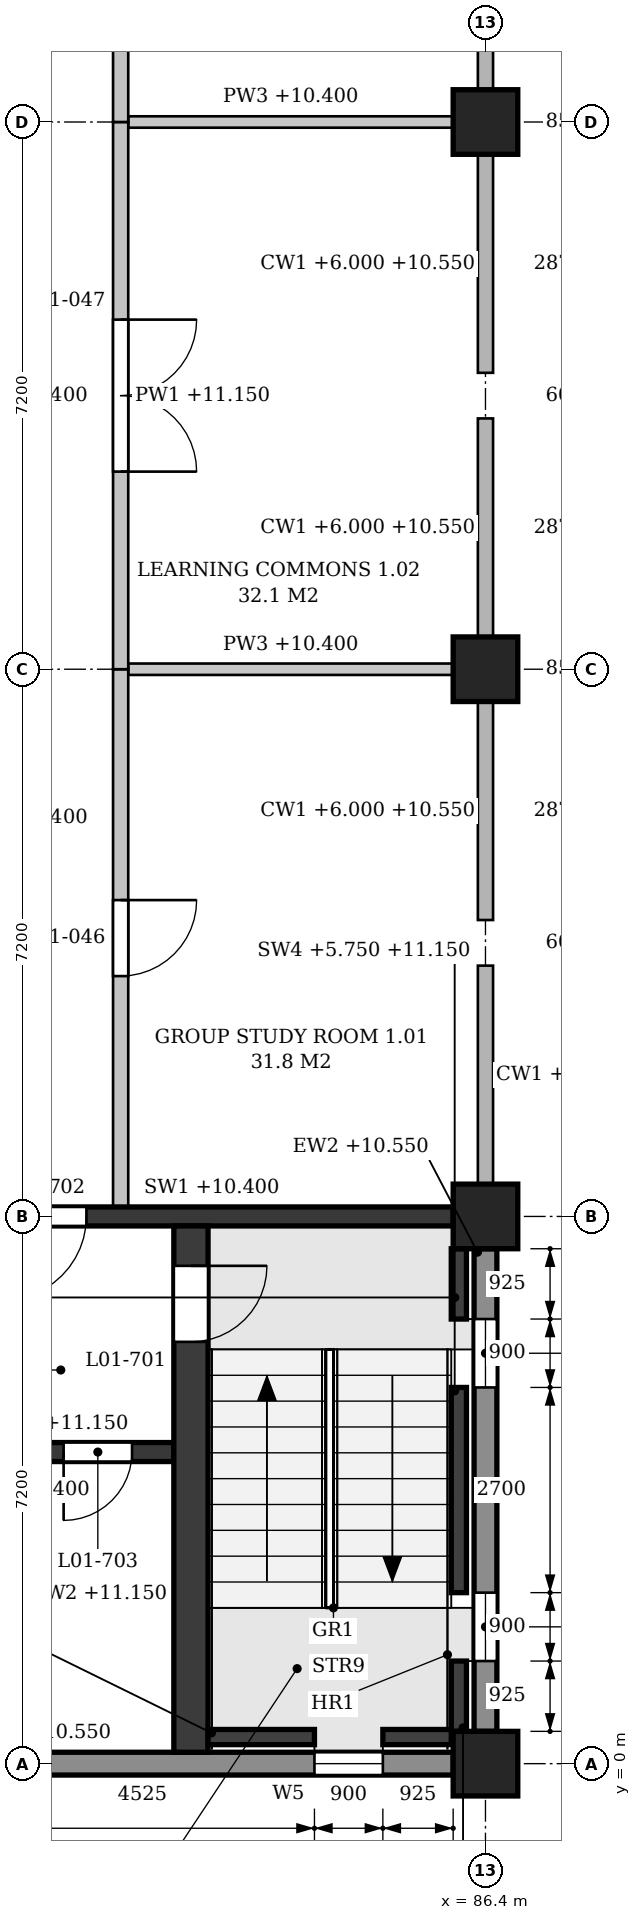
"""IFC4 building model, lengths in metres.
Left out: names, types, materials, properties, quantities, classifications, styles, units other than length and angle.
Written with IfcOpenShell. Run it as: python <this file> out.ifc"""

import sys

from ifc_helpers import new_model, si_unit, direction, frame, frame_2d, origin, origin_2d, place, context, subcontext, project, spatial, polyline, rectangle, outline, extrude, element, fill, save


model = new_model("IFC4")
c1 = context("Model", 3, precision=1e-05, world=origin(), true_north=direction((0.0, 1.0)))
c2 = subcontext(c1, "Body", "Model", "MODEL_VIEW")
j1 = project(units=[si_unit("LENGTHUNIT", "METRE"), si_unit("PLANEANGLEUNIT", "RADIAN")], contexts=[c1])
p1 = place(None, origin())
s1 = spatial("IfcSite", under=j1, at=p1, CompositionType="ELEMENT")
p2 = place(p1, origin())
s2 = spatial("IfcBuilding", under=s1, at=p2, CompositionType="ELEMENT")
p3 = place(p2, frame((0.0, 0.0, 6.0)))
s3 = spatial("IfcBuildingStorey", under=s2, at=p3, CompositionType="ELEMENT", Elevation=6.0)
for number, where, z_axis, x_axis in (
    (1, (86.4, 0.0, 0.0), (0.0, 0.0, 1.0), (1.0, 0.0, 0.0)),
    (2, (86.4, 7.2, 0.0), (0.0, 0.0, 1.0), (1.0, 0.0, 0.0)),
    (3, (86.4, 14.4, 0.0), (0.0, 0.0, 1.0), (1.0, 0.0, 0.0)),
    (4, (86.4, 21.6, 0.0), (0.0, 0.0, 1.0), (1.0, 0.0, 0.0)),
):
    element("IfcColumn", number, at=place(p3, frame(where, z_axis=z_axis, x_axis=x_axis)), inside=s3, PredefinedType="COLUMN", context=c2, shape_type="SweptSolid", body=[
        extrude(rectangle(XDim=0.85, YDim=0.85, at=origin_2d()), origin(), (0.0, 0.0, 1.0), 5.4),
    ])
p4 = place(p3, frame((79.625, 0.0, 0.0), z_axis=(0.0, 0.0, 1.0), x_axis=(1.0, 0.0, 0.0)))
e5 = element("IfcWall", 5, at=p4, inside=s3, PredefinedType="STANDARD", context=c2, shape_type="SweptSolid", body=[
    extrude(rectangle(XDim=6.35, YDim=0.3, at=frame_2d((3.175, 0.0))), origin(), (0.0, 0.0, 1.0), 4.55),
])
p5 = place(p4, frame((4.525, 0.0, 0.9)))
e6 = element("IfcOpeningElement", 6, at=p5, cuts=e5, PredefinedType="OPENING", context=c2, shape_type="SweptSolid", body=[
    extrude(outline(polyline([(0.0, 0.0), (0.9, 0.0), (0.9, 3.15), (0.45, 3.6), (0.0, 3.15), (0.0, 0.0)])), frame((0.0, 0.16, 0.0), z_axis=(0.0, -1.0, 0.0), x_axis=(1.0, 0.0, 0.0)), (0.0, 0.0, 1.0), 0.32),
])
p6 = place(p3, frame((86.4, 0.425, 0.0), z_axis=(0.0, 0.0, 1.0), x_axis=(0.0, 1.0, 0.0)))
e7 = element("IfcWall", 7, at=p6, inside=s3, PredefinedType="STANDARD", context=c2, shape_type="SweptSolid", body=[
    extrude(rectangle(XDim=6.35, YDim=0.3, at=frame_2d((3.175, 0.0))), origin(), (0.0, 0.0, 1.0), 4.55),
])
p7 = place(p6, frame((0.925, 0.0, 0.9)))
e8 = element("IfcOpeningElement", 8, at=p7, cuts=e7, PredefinedType="OPENING", context=c2, shape_type="SweptSolid", body=[
    extrude(outline(polyline([(0.0, 0.0), (0.9, 0.0), (0.9, 3.15), (0.45, 3.6), (0.0, 3.15), (0.0, 0.0)])), frame((0.0, 0.16, 0.0), z_axis=(0.0, -1.0, 0.0), x_axis=(1.0, 0.0, 0.0)), (0.0, 0.0, 1.0), 0.32),
])
p8 = place(p6, frame((4.525, 0.0, 0.9)))
e9 = element("IfcOpeningElement", 9, at=p8, cuts=e7, PredefinedType="OPENING", context=c2, shape_type="SweptSolid", body=[
    extrude(outline(polyline([(0.0, 0.0), (0.9, 0.0), (0.9, 3.15), (0.45, 3.6), (0.0, 3.15), (0.0, 0.0)])), frame((0.0, 0.16, 0.0), z_axis=(0.0, -1.0, 0.0), x_axis=(1.0, 0.0, 0.0)), (0.0, 0.0, 1.0), 0.32),
])
p9 = place(p3, frame((79.625, 7.2, 0.0), z_axis=(0.0, 0.0, 1.0), x_axis=(1.0, 0.0, 0.0)))
e10 = element("IfcWall", 10, at=p9, inside=s3, PredefinedType="SHEAR", context=c2, shape_type="SweptSolid", body=[
    extrude(rectangle(XDim=6.35, YDim=0.25, at=frame_2d((3.175, 0.0))), origin(), (0.0, 0.0, 1.0), 4.4),
])
p10 = place(p9, frame((0.425, 0.0, 0.0)))
e11 = element("IfcOpeningElement", 11, at=p10, cuts=e10, PredefinedType="OPENING", context=c2, shape_type="SweptSolid", body=[
    extrude(rectangle(XDim=1.1, YDim=2.1, at=frame_2d((0.55, 1.05))), frame((0.0, 0.135, 0.0), z_axis=(0.0, -1.0, 0.0), x_axis=(1.0, 0.0, 0.0)), (0.0, 0.0, 1.0), 0.27),
])
p11 = place(p3, frame((86.05, 0.425, -0.25), z_axis=(0.0, 0.0, 1.0), x_axis=(0.0, 1.0, 0.0)))
e12 = element("IfcWall", 12, at=p11, inside=s3, PredefinedType="SHEAR", context=c2, shape_type="SweptSolid", body=[
    extrude(rectangle(XDim=0.925, YDim=0.2, at=frame_2d((0.462, 0.0))), origin(), (0.0, 0.0, 1.0), 5.4),
])
p12 = place(p3, frame((86.05, 2.25, -0.25), z_axis=(0.0, 0.0, 1.0), x_axis=(0.0, 1.0, 0.0)))
e13 = element("IfcWall", 13, at=p12, inside=s3, PredefinedType="SHEAR", context=c2, shape_type="SweptSolid", body=[
    extrude(rectangle(XDim=2.7, YDim=0.2, at=frame_2d((1.35, 0.0))), origin(), (0.0, 0.0, 1.0), 5.4),
])
p13 = place(p3, frame((86.05, 5.85, -0.25), z_axis=(0.0, 0.0, 1.0), x_axis=(0.0, 1.0, 0.0)))
e14 = element("IfcWall", 14, at=p13, inside=s3, PredefinedType="SHEAR", context=c2, shape_type="SweptSolid", body=[
    extrude(rectangle(XDim=0.925, YDim=0.2, at=frame_2d((0.462, 0.0))), origin(), (0.0, 0.0, 1.0), 5.4),
])
p14 = place(p3, frame((82.75, 0.35, -0.25), z_axis=(0.0, 0.0, 1.0), x_axis=(1.0, 0.0, 0.0)))
e15 = element("IfcWall", 15, at=p14, inside=s3, PredefinedType="SHEAR", context=c2, shape_type="SweptSolid", body=[
    extrude(rectangle(XDim=1.4, YDim=0.2, at=frame_2d((0.7, 0.0))), origin(), (0.0, 0.0, 1.0), 5.4),
])
p15 = place(p3, frame((85.05, 0.35, -0.25), z_axis=(0.0, 0.0, 1.0), x_axis=(1.0, 0.0, 0.0)))
e16 = element("IfcWall", 16, at=p15, inside=s3, PredefinedType="SHEAR", context=c2, shape_type="SweptSolid", body=[
    extrude(rectangle(XDim=0.9, YDim=0.2, at=frame_2d((0.45, 0.0))), origin(), (0.0, 0.0, 1.0), 5.4),
])
p16 = place(p3, frame((82.525, 0.15, 0.0), z_axis=(0.0, 0.0, 1.0), x_axis=(0.0, 1.0, 0.0)))
e17 = element("IfcWall", 17, at=p16, inside=s3, PredefinedType="SHEAR", context=c2, shape_type="SweptSolid", body=[
    extrude(rectangle(XDim=6.925, YDim=0.45, at=frame_2d((3.462, 0.0))), origin(), (0.0, 0.0, 1.0), 5.15),
])
p17 = place(p16, frame((5.4, 0.0, 0.0)))
e18 = element("IfcOpeningElement", 18, at=p17, cuts=e17, PredefinedType="OPENING", context=c2, shape_type="SweptSolid", body=[
    extrude(rectangle(XDim=1.0, YDim=2.1, at=frame_2d((0.5, 1.05))), frame((0.0, 0.235, 0.0), z_axis=(0.0, -1.0, 0.0), x_axis=(1.0, 0.0, 0.0)), (0.0, 0.0, 1.0), 0.47),
])
p18 = place(p3, frame((79.325, 4.1, 0.0), z_axis=(0.0, 0.0, 1.0), x_axis=(1.0, 0.0, 0.0)))
e19 = element("IfcWall", 19, at=p18, inside=s3, PredefinedType="SHEAR", context=c2, shape_type="SweptSolid", body=[
    extrude(rectangle(XDim=2.975, YDim=0.25, at=frame_2d((1.488, 0.0))), origin(), (0.0, 0.0, 1.0), 5.15),
])
p19 = place(p18, frame((1.525, 0.0, 0.0)))
e20 = element("IfcOpeningElement", 20, at=p19, cuts=e19, PredefinedType="OPENING", context=c2, shape_type="SweptSolid", body=[
    extrude(rectangle(XDim=0.9, YDim=2.1, at=frame_2d((0.45, 1.05))), frame((0.0, 0.135, 0.0), z_axis=(0.0, -1.0, 0.0), x_axis=(1.0, 0.0, 0.0)), (0.0, 0.0, 1.0), 0.27),
])
for number, where, z_axis, x_axis in (
    (21, (81.7, 14.4, 0.0), (0.0, 0.0, 1.0), (1.0, 0.0, 0.0)),
    (22, (81.7, 21.6, 0.0), (0.0, 0.0, 1.0), (1.0, 0.0, 0.0)),
):
    element("IfcWall", number, at=place(p3, frame(where, z_axis=z_axis, x_axis=x_axis)), inside=s3, PredefinedType="PARTITIONING", context=c2, shape_type="SweptSolid", body=[
        extrude(rectangle(XDim=4.275, YDim=0.15, at=frame_2d((2.138, 0.0))), origin(), (0.0, 0.0, 1.0), 4.4),
    ])
p20 = place(p3, frame((81.6, 7.325, 0.0), z_axis=(0.0, 0.0, 1.0), x_axis=(0.0, 1.0, 0.0)))
e23 = element("IfcWall", 23, at=p20, inside=s3, PredefinedType="PARTITIONING", context=c2, shape_type="SweptSolid", body=[
    extrude(outline(polyline([(0.0, 0.0), (7.075, 0.0), (7.075, 4.4), (6.825, 4.4), (6.825, 5.15), (0.125, 5.15), (0.125, 4.4), (0.0, 4.4), (0.0, 0.0)])), frame((0.0, 0.1, 0.0), z_axis=(0.0, -1.0, 0.0), x_axis=(1.0, 0.0, 0.0)), (0.0, 0.0, 1.0), 0.2),
])
p21 = place(p20, frame((3.037, 0.0, 0.0)))
e24 = element("IfcOpeningElement", 24, at=p21, cuts=e23, PredefinedType="OPENING", context=c2, shape_type="SweptSolid", body=[
    extrude(rectangle(XDim=1.0, YDim=2.1, at=frame_2d((0.5, 1.05))), frame((0.0, 0.11, 0.0), z_axis=(0.0, -1.0, 0.0), x_axis=(1.0, 0.0, 0.0)), (0.0, 0.0, 1.0), 0.22),
])
p22 = place(p3, frame((81.6, 14.4, 0.0), z_axis=(0.0, 0.0, 1.0), x_axis=(0.0, 1.0, 0.0)))
e25 = element("IfcWall", 25, at=p22, inside=s3, PredefinedType="PARTITIONING", context=c2, shape_type="SweptSolid", body=[
    extrude(outline(polyline([(0.0, 0.0), (7.2, 0.0), (7.2, 4.4), (6.95, 4.4), (6.95, 5.15), (0.25, 5.15), (0.25, 4.4), (0.0, 4.4), (0.0, 0.0)])), frame((0.0, 0.1, 0.0), z_axis=(0.0, -1.0, 0.0), x_axis=(1.0, 0.0, 0.0)), (0.0, 0.0, 1.0), 0.2),
])
p23 = place(p22, frame((2.6, 0.0, 0.0)))
e26 = element("IfcOpeningElement", 26, at=p23, cuts=e25, PredefinedType="OPENING", context=c2, shape_type="SweptSolid", body=[
    extrude(rectangle(XDim=2.0, YDim=2.1, at=frame_2d((1.0, 1.05))), frame((0.0, 0.11, 0.0), z_axis=(0.0, -1.0, 0.0), x_axis=(1.0, 0.0, 0.0)), (0.0, 0.0, 1.0), 0.22),
])
p24 = place(p3, frame((81.6, 21.6, 0.0), z_axis=(0.0, 0.0, 1.0), x_axis=(0.0, 1.0, 0.0)))
e27 = element("IfcWall", 27, at=p24, inside=s3, PredefinedType="PARTITIONING", context=c2, shape_type="SweptSolid", body=[
    extrude(outline(polyline([(0.0, 0.0), (7.2, 0.0), (7.2, 4.4), (6.95, 4.4), (6.95, 5.15), (0.25, 5.15), (0.25, 4.4), (0.0, 4.4), (0.0, 0.0)])), frame((0.0, 0.1, 0.0), z_axis=(0.0, -1.0, 0.0), x_axis=(1.0, 0.0, 0.0)), (0.0, 0.0, 1.0), 0.2),
])
p25 = place(p24, frame((2.6, 0.0, 0.0)))
e28 = element("IfcOpeningElement", 28, at=p25, cuts=e27, PredefinedType="OPENING", context=c2, shape_type="SweptSolid", body=[
    extrude(rectangle(XDim=2.0, YDim=2.1, at=frame_2d((1.0, 1.05))), frame((0.0, 0.11, 0.0), z_axis=(0.0, -1.0, 0.0), x_axis=(1.0, 0.0, 0.0)), (0.0, 0.0, 1.0), 0.22),
])
p26 = place(p7, origin())
e29 = element("IfcWindow", 29, at=p26, inside=s3, PartitioningType="SINGLE_PANEL", PredefinedType="WINDOW", context=c2, shape_type="SweptSolid", body=[
    extrude(outline(polyline([(0.0, 0.0), (0.9, 0.0), (0.9, 3.15), (0.45, 3.6), (0.0, 3.15), (0.0, 0.0)])), frame((0.0, 0.03, 0.0), z_axis=(0.0, -1.0, 0.0), x_axis=(1.0, 0.0, 0.0)), (0.0, 0.0, 1.0), 0.06),
])
fill(e8, e29)
p27 = place(p8, origin())
e30 = element("IfcWindow", 30, at=p27, inside=s3, PartitioningType="SINGLE_PANEL", PredefinedType="WINDOW", context=c2, shape_type="SweptSolid", body=[
    extrude(outline(polyline([(0.0, 0.0), (0.9, 0.0), (0.9, 3.15), (0.45, 3.6), (0.0, 3.15), (0.0, 0.0)])), frame((0.0, 0.03, 0.0), z_axis=(0.0, -1.0, 0.0), x_axis=(1.0, 0.0, 0.0)), (0.0, 0.0, 1.0), 0.06),
])
fill(e9, e30)
p28 = place(p5, origin())
e31 = element("IfcWindow", 31, at=p28, inside=s3, PartitioningType="SINGLE_PANEL", PredefinedType="WINDOW", context=c2, shape_type="SweptSolid", body=[
    extrude(outline(polyline([(0.0, 0.0), (0.9, 0.0), (0.9, 3.15), (0.45, 3.6), (0.0, 3.15), (0.0, 0.0)])), frame((0.0, 0.03, 0.0), z_axis=(0.0, -1.0, 0.0), x_axis=(1.0, 0.0, 0.0)), (0.0, 0.0, 1.0), 0.06),
])
fill(e6, e31)
p29 = place(p17, frame((1.0, 0.0, 0.0), z_axis=(0.0, 0.0, 1.0), x_axis=(-1.0, 0.0, 0.0)))
e32 = element("IfcDoor", 32, at=p29, inside=s3, OperationType="SINGLE_SWING_LEFT", PredefinedType="DOOR", context=c2, shape_type="SweptSolid", body=[
    extrude(rectangle(XDim=1.0, YDim=2.1, at=frame_2d((0.5, 1.05))), frame((0.0, 0.025, 0.0), z_axis=(0.0, -1.0, 0.0), x_axis=(1.0, 0.0, 0.0)), (0.0, 0.0, 1.0), 0.05),
])
fill(e18, e32)
p30 = place(p10, frame((1.1, 0.0, 0.0), z_axis=(0.0, 0.0, 1.0), x_axis=(-1.0, 0.0, 0.0)))
e33 = element("IfcDoor", 33, at=p30, inside=s3, OperationType="SINGLE_SWING_RIGHT", PredefinedType="DOOR", context=c2, shape_type="SweptSolid", body=[
    extrude(rectangle(XDim=1.1, YDim=2.1, at=frame_2d((0.55, 1.05))), frame((0.0, 0.025, 0.0), z_axis=(0.0, -1.0, 0.0), x_axis=(1.0, 0.0, 0.0)), (0.0, 0.0, 1.0), 0.05),
])
fill(e11, e33)
p31 = place(p19, frame((0.9, 0.0, 0.0), z_axis=(0.0, 0.0, 1.0), x_axis=(-1.0, 0.0, 0.0)))
e34 = element("IfcDoor", 34, at=p31, inside=s3, OperationType="SINGLE_SWING_RIGHT", PredefinedType="DOOR", context=c2, shape_type="SweptSolid", body=[
    extrude(rectangle(XDim=0.9, YDim=2.1, at=frame_2d((0.45, 1.05))), frame((0.0, 0.025, 0.0), z_axis=(0.0, -1.0, 0.0), x_axis=(1.0, 0.0, 0.0)), (0.0, 0.0, 1.0), 0.05),
])
fill(e20, e34)
p32 = place(p21, frame((1.0, 0.0, 0.0), z_axis=(0.0, 0.0, 1.0), x_axis=(-1.0, 0.0, 0.0)))
e35 = element("IfcDoor", 35, at=p32, inside=s3, OperationType="SINGLE_SWING_LEFT", PredefinedType="DOOR", context=c2, shape_type="SweptSolid", body=[
    extrude(rectangle(XDim=1.0, YDim=2.1, at=frame_2d((0.5, 1.05))), frame((0.0, 0.025, 0.0), z_axis=(0.0, -1.0, 0.0), x_axis=(1.0, 0.0, 0.0)), (0.0, 0.0, 1.0), 0.05),
])
fill(e24, e35)
p33 = place(p23, origin())
e36 = element("IfcDoor", 36, at=p33, inside=s3, OperationType="DOUBLE_DOOR_SINGLE_SWING", PredefinedType="DOOR", context=c2, shape_type="SweptSolid", body=[
    extrude(rectangle(XDim=2.0, YDim=2.1, at=frame_2d((1.0, 1.05))), frame((0.0, 0.025, 0.0), z_axis=(0.0, -1.0, 0.0), x_axis=(1.0, 0.0, 0.0)), (0.0, 0.0, 1.0), 0.05),
])
fill(e26, e36)
save(model, sys.argv[1])
